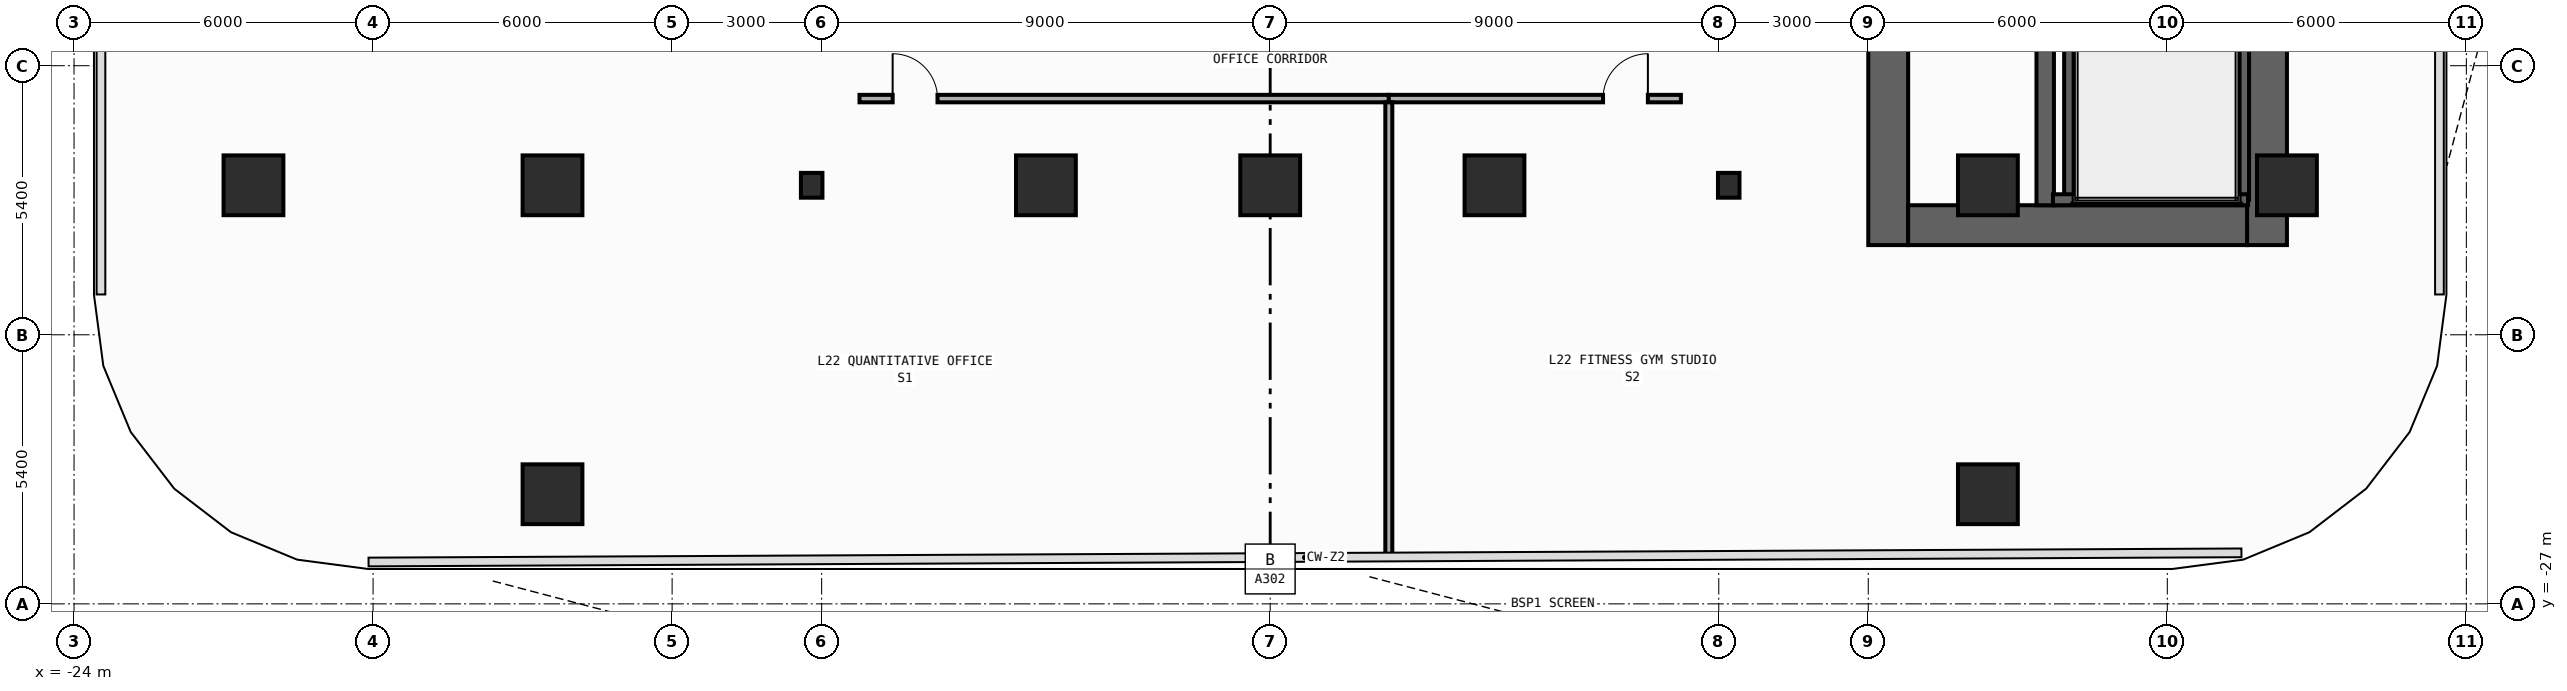
"""IFC4 building model, lengths in metres.
Left out: names, types, materials, properties, quantities, classifications, styles, units other than length and angle.
Written with IfcOpenShell. Run it as: python <this file> out.ifc"""

import sys

from ifc_helpers import new_model, si_unit, direction, frame, frame_2d, origin, origin_2d, place, context, subcontext, project, spatial, rectangle, i_section, extrude, element, fill, save


model = new_model("IFC4")
c1 = context("Model", 3, precision=1e-05, world=origin(), true_north=direction((0.0, 1.0)))
c2 = subcontext(c1, "Body", "Model", "MODEL_VIEW")
j1 = project(units=[si_unit("LENGTHUNIT", "METRE"), si_unit("PLANEANGLEUNIT", "RADIAN")], contexts=[c1])
p1 = place(None, origin())
s1 = spatial("IfcSite", under=j1, at=p1, CompositionType="ELEMENT")
p2 = place(p1, origin())
s2 = spatial("IfcBuilding", under=s1, at=p2, CompositionType="ELEMENT")
p3 = place(p2, frame((0.0, 0.0, 97.4)))
s3 = spatial("IfcBuildingStorey", under=s2, at=p3, CompositionType="ELEMENT", Elevation=97.4)
p4 = place(p3, frame((12.4, -19.8, 0.0), z_axis=(0.0, 0.0, 1.0), x_axis=(0.0, 1.0, 0.0)))
e1 = element("IfcWall", 1, at=p4, inside=s3, PredefinedType="SHEAR", context=c2, shape_type="SweptSolid", body=[
    extrude(rectangle(XDim=27.0, YDim=0.8, at=frame_2d((13.5, 0.0))), origin(), (0.0, 0.0, 1.0), 3.94),
])
p5 = place(p4, frame((23.05, 0.0, 0.0)))
e2 = element("IfcOpeningElement", 2, at=p5, cuts=e1, PredefinedType="OPENING", context=c2, shape_type="SweptSolid", body=[
    extrude(rectangle(XDim=1.1, YDim=2.2, at=frame_2d((0.55, 1.1))), frame((0.0, 0.41, 0.0), z_axis=(0.0, -1.0, 0.0), x_axis=(1.0, 0.0, 0.0)), (0.0, 0.0, 1.0), 0.82),
])
p6 = place(p4, frame((19.85, 0.0, 0.0)))
e3 = element("IfcOpeningElement", 3, at=p6, cuts=e1, PredefinedType="OPENING", context=c2, shape_type="SweptSolid", body=[
    extrude(rectangle(XDim=1.1, YDim=2.2, at=frame_2d((0.55, 1.1))), frame((0.0, 0.41, 0.0), z_axis=(0.0, -1.0, 0.0), x_axis=(1.0, 0.0, 0.0)), (0.0, 0.0, 1.0), 0.82),
])
p7 = place(p4, frame((16.65, 0.0, 0.0)))
e4 = element("IfcOpeningElement", 4, at=p7, cuts=e1, PredefinedType="OPENING", context=c2, shape_type="SweptSolid", body=[
    extrude(rectangle(XDim=1.1, YDim=2.2, at=frame_2d((0.55, 1.1))), frame((0.0, 0.41, 0.0), z_axis=(0.0, -1.0, 0.0), x_axis=(1.0, 0.0, 0.0)), (0.0, 0.0, 1.0), 0.82),
])
p8 = place(p4, frame((6.275, 0.0, 0.0)))
e5 = element("IfcOpeningElement", 5, at=p8, cuts=e1, PredefinedType="OPENING", context=c2, shape_type="SweptSolid", body=[
    extrude(rectangle(XDim=0.85, YDim=2.1, at=frame_2d((0.425, 1.05))), frame((0.0, 0.41, 0.0), z_axis=(0.0, -1.0, 0.0), x_axis=(1.0, 0.0, 0.0)), (0.0, 0.0, 1.0), 0.82),
])
p9 = place(p4, frame((8.575, 0.0, 0.0)))
e6 = element("IfcOpeningElement", 6, at=p9, cuts=e1, PredefinedType="OPENING", context=c2, shape_type="SweptSolid", body=[
    extrude(rectangle(XDim=0.85, YDim=2.1, at=frame_2d((0.425, 1.05))), frame((0.0, 0.41, 0.0), z_axis=(0.0, -1.0, 0.0), x_axis=(1.0, 0.0, 0.0)), (0.0, 0.0, 1.0), 0.82),
])
p10 = place(p4, frame((10.675, 0.0, 0.0)))
e7 = element("IfcOpeningElement", 7, at=p10, cuts=e1, PredefinedType="OPENING", context=c2, shape_type="SweptSolid", body=[
    extrude(rectangle(XDim=0.85, YDim=2.1, at=frame_2d((0.425, 1.05))), frame((0.0, 0.41, 0.0), z_axis=(0.0, -1.0, 0.0), x_axis=(1.0, 0.0, 0.0)), (0.0, 0.0, 1.0), 0.82),
])
p11 = place(p4, frame((12.725, 0.0, 0.0)))
e8 = element("IfcOpeningElement", 8, at=p11, cuts=e1, PredefinedType="OPENING", context=c2, shape_type="SweptSolid", body=[
    extrude(rectangle(XDim=1.15, YDim=2.2, at=frame_2d((0.575, 1.1))), frame((0.0, 0.41, 0.0), z_axis=(0.0, -1.0, 0.0), x_axis=(1.0, 0.0, 0.0)), (0.0, 0.0, 1.0), 0.82),
])
p12 = place(p4, frame((25.125, 0.0, 0.0)))
e9 = element("IfcOpeningElement", 9, at=p12, cuts=e1, PredefinedType="OPENING", context=c2, shape_type="SweptSolid", body=[
    extrude(rectangle(XDim=0.85, YDim=2.1, at=frame_2d((0.425, 1.05))), frame((0.0, 0.41, 0.0), z_axis=(0.0, -1.0, 0.0), x_axis=(1.0, 0.0, 0.0)), (0.0, 0.0, 1.0), 0.82),
])
p13 = place(p3, frame((20.0, -19.8, 0.0), z_axis=(0.0, 0.0, 1.0), x_axis=(0.0, 1.0, 0.0)))
e10 = element("IfcWall", 10, at=p13, inside=s3, PredefinedType="SHEAR", context=c2, shape_type="SweptSolid", body=[
    extrude(rectangle(XDim=27.0, YDim=0.8, at=frame_2d((13.5, 0.0))), origin(), (0.0, 0.0, 1.0), 3.94),
])
p14 = place(p3, frame((12.8, -19.4, 0.0), z_axis=(0.0, 0.0, 1.0), x_axis=(1.0, 0.0, 0.0)))
e11 = element("IfcWall", 11, at=p14, inside=s3, PredefinedType="SHEAR", context=c2, shape_type="SweptSolid", body=[
    extrude(rectangle(XDim=6.8, YDim=0.8, at=frame_2d((3.4, 0.0))), origin(), (0.0, 0.0, 1.0), 3.94),
])
p15 = place(p3, frame((15.55, -19.0, 0.0), z_axis=(0.0, 0.0, 1.0), x_axis=(0.0, 1.0, 0.0)))
e12 = element("IfcWall", 12, at=p15, inside=s3, PredefinedType="SHEAR", context=c2, shape_type="SweptSolid", body=[
    extrude(rectangle(XDim=25.4, YDim=0.35, at=frame_2d((12.7, 0.0))), origin(), (0.0, 0.0, 1.0), 3.94),
])
p16 = place(p15, frame((11.925, 0.0, 0.0)))
e13 = element("IfcOpeningElement", 13, at=p16, cuts=e12, PredefinedType="OPENING", context=c2, shape_type="SweptSolid", body=[
    extrude(rectangle(XDim=1.15, YDim=2.2, at=frame_2d((0.575, 1.1))), frame((0.0, 0.185, 0.0), z_axis=(0.0, -1.0, 0.0), x_axis=(1.0, 0.0, 0.0)), (0.0, 0.0, 1.0), 0.37),
])
p17 = place(p15, frame((24.325, 0.0, 0.0)))
e14 = element("IfcOpeningElement", 14, at=p17, cuts=e12, PredefinedType="OPENING", context=c2, shape_type="SweptSolid", body=[
    extrude(rectangle(XDim=0.85, YDim=2.1, at=frame_2d((0.425, 1.05))), frame((0.0, 0.185, 0.0), z_axis=(0.0, -1.0, 0.0), x_axis=(1.0, 0.0, 0.0)), (0.0, 0.0, 1.0), 0.37),
])
for number, where, z_axis, x_axis in (
    (15, (16.04, -18.89, 0.0), (0.0, 0.0, 1.0), (0.0, 1.0, 0.0)),
    (16, (19.53, -18.89, 0.0), (0.0, 0.0, 1.0), (0.0, 1.0, 0.0)),
):
    element("IfcWall", number, at=place(p3, frame(where, z_axis=z_axis, x_axis=x_axis)), inside=s3, PredefinedType="SHEAR", context=c2, shape_type="SweptSolid", body=[
        extrude(rectangle(XDim=11.3, YDim=0.22, at=frame_2d((5.65, 0.0))), origin(), (0.0, 0.0, 1.0), 3.94),
    ])
p18 = place(p3, frame((15.705, -18.89, 0.0), z_axis=(0.0, 0.0, 1.0), x_axis=(1.0, 0.0, 0.0)))
e17 = element("IfcWall", 17, at=p18, inside=s3, PredefinedType="SHEAR", context=c2, shape_type="SweptSolid", body=[
    extrude(rectangle(XDim=3.915, YDim=0.22, at=frame_2d((1.958, 0.0))), origin(), (0.0, 0.0, 1.0), 3.94),
])
for number, where, z_axis, x_axis in (
    (18, (-9.2, -18.6, 0.0), (0.0, 0.0, 1.0), (1.0, 0.0, 0.0)),
    (19, (9.2, -18.6, 0.0), (0.0, 0.0, 1.0), (1.0, 0.0, 0.0)),
):
    element("IfcColumn", number, at=place(p3, frame(where, z_axis=z_axis, x_axis=x_axis)), inside=s3, PredefinedType="COLUMN", context=c2, shape_type="SweptSolid", body=[
        extrude(i_section(OverallWidth=0.432, OverallDepth=0.498, WebThickness=0.045, FlangeThickness=0.07, FilletRadius=0.022, at=origin_2d()), origin(), (0.0, 0.0, 1.0), 4.2),
    ])
for number, where, z_axis, x_axis in (
    (20, (-20.4, -18.6, 0.0), (0.0, 0.0, 1.0), (1.0, 0.0, 0.0)),
    (21, (20.4, -18.6, 0.0), (0.0, 0.0, 1.0), (1.0, 0.0, 0.0)),
    (22, (-14.4, -18.6, 0.0), (0.0, 0.0, 1.0), (1.0, 0.0, 0.0)),
    (23, (14.4, -18.6, 0.0), (0.0, 0.0, 1.0), (1.0, 0.0, 0.0)),
    (24, (-4.5, -18.6, 0.0), (0.0, 0.0, 1.0), (1.0, 0.0, 0.0)),
    (25, (0.0, -18.6, 0.0), (0.0, 0.0, 1.0), (1.0, 0.0, 0.0)),
    (26, (4.5, -18.6, 0.0), (0.0, 0.0, 1.0), (1.0, 0.0, 0.0)),
    (27, (-14.4, -24.8, 0.0), (0.0, 0.0, 1.0), (1.0, 0.0, 0.0)),
    (28, (14.4, -24.8, 0.0), (0.0, 0.0, 1.0), (1.0, 0.0, 0.0)),
):
    element("IfcColumn", number, at=place(p3, frame(where, z_axis=z_axis, x_axis=x_axis)), inside=s3, PredefinedType="COLUMN", context=c2, shape_type="SweptSolid", body=[
        extrude(rectangle(XDim=1.2, YDim=1.2, at=origin_2d()), origin(), (0.0, 0.0, 1.0), 4.2),
    ])
p19 = place(p3, frame((-8.24, -16.86, 0.0), z_axis=(0.0, 0.0, 1.0), x_axis=(1.0, 0.0, 0.0)))
e29 = element("IfcWall", 29, at=p19, inside=s3, PredefinedType="PARTITIONING", context=c2, shape_type="SweptSolid", body=[
    extrude(rectangle(XDim=10.62, YDim=0.15, at=frame_2d((5.31, 0.0))), origin(), (0.0, 0.0, 1.0), 3.94),
])
p20 = place(p19, frame((0.665, 0.0, 0.0)))
e30 = element("IfcOpeningElement", 30, at=p20, cuts=e29, PredefinedType="OPENING", context=c2, shape_type="SweptSolid", body=[
    extrude(rectangle(XDim=0.9, YDim=2.15, at=frame_2d((0.45, 1.075))), frame((0.0, 0.085, 0.0), z_axis=(0.0, -1.0, 0.0), x_axis=(1.0, 0.0, 0.0)), (0.0, 0.0, 1.0), 0.17),
])
p21 = place(p3, frame((2.38, -16.86, 0.0), z_axis=(0.0, 0.0, 1.0), x_axis=(1.0, 0.0, 0.0)))
e31 = element("IfcWall", 31, at=p21, inside=s3, PredefinedType="PARTITIONING", context=c2, shape_type="SweptSolid", body=[
    extrude(rectangle(XDim=5.86, YDim=0.15, at=frame_2d((2.93, 0.0))), origin(), (0.0, 0.0, 1.0), 3.94),
])
p22 = place(p21, frame((4.298, 0.0, 0.0)))
e32 = element("IfcOpeningElement", 32, at=p22, cuts=e31, PredefinedType="OPENING", context=c2, shape_type="SweptSolid", body=[
    extrude(rectangle(XDim=0.9, YDim=2.15, at=frame_2d((0.45, 1.075))), frame((0.0, 0.085, 0.0), z_axis=(0.0, -1.0, 0.0), x_axis=(1.0, 0.0, 0.0)), (0.0, 0.0, 1.0), 0.17),
])
p23 = place(p3, frame((2.38, -26.055, 0.0), z_axis=(0.0, 0.0, 1.0), x_axis=(0.0, 1.0, 0.0)))
e33 = element("IfcWall", 33, at=p23, inside=s3, PredefinedType="PARTITIONING", context=c2, shape_type="SweptSolid", body=[
    extrude(rectangle(XDim=9.12, YDim=0.14, at=frame_2d((4.56, 0.0))), origin(), (0.0, 0.0, 1.0), 3.94),
])
p24 = place(p20, origin())
e34 = element("IfcDoor", 34, at=p24, inside=s3, OperationType="SINGLE_SWING_LEFT", PredefinedType="DOOR", context=c2, shape_type="SweptSolid", body=[
    extrude(rectangle(XDim=0.9, YDim=2.15, at=frame_2d((0.45, 1.075))), frame((0.0, 0.025, 0.0), z_axis=(0.0, -1.0, 0.0), x_axis=(1.0, 0.0, 0.0)), (0.0, 0.0, 1.0), 0.05),
])
fill(e30, e34)
p25 = place(p22, origin())
e35 = element("IfcDoor", 35, at=p25, inside=s3, OperationType="SINGLE_SWING_RIGHT", PredefinedType="DOOR", context=c2, shape_type="SweptSolid", body=[
    extrude(rectangle(XDim=0.9, YDim=2.15, at=frame_2d((0.45, 1.075))), frame((0.0, 0.025, 0.0), z_axis=(0.0, -1.0, 0.0), x_axis=(1.0, 0.0, 0.0)), (0.0, 0.0, 1.0), 0.05),
])
fill(e32, e35)
save(model, sys.argv[1])
